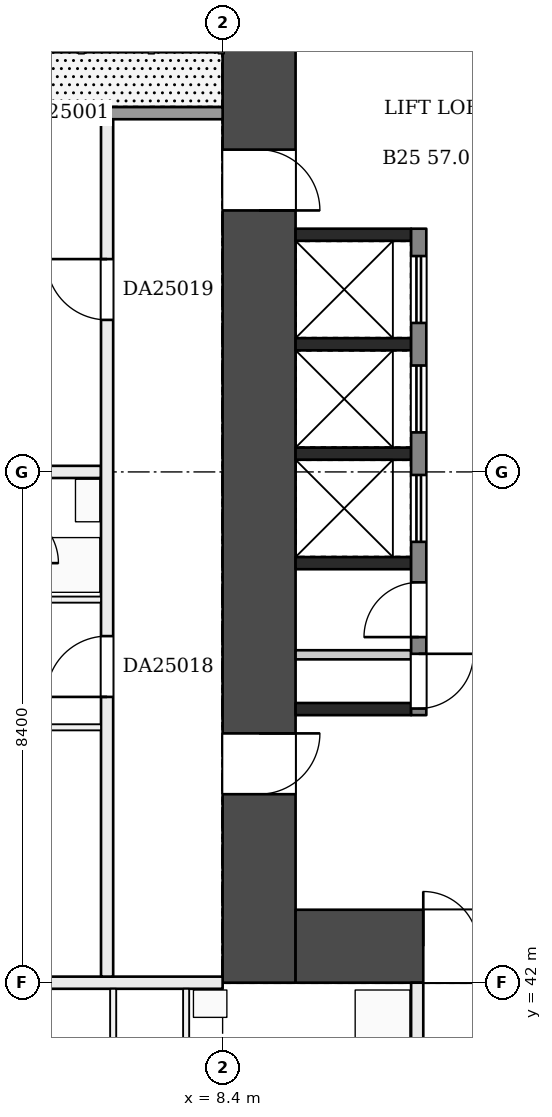
"""IFC4 building model, lengths in metres.
Left out: names, types, materials, properties, quantities, classifications, styles, units other than length and angle.
Written with IfcOpenShell. Run it as: python <this file> out.ifc"""

import sys

from ifc_helpers import new_model, si_unit, direction, frame, frame_2d, origin, place, context, subcontext, project, spatial, rectangle, extrude, element, fill, save


model = new_model("IFC4")
c1 = context("Model", 3, precision=1e-05, world=origin(), true_north=direction((0.0, 1.0)))
c2 = subcontext(c1, "Body", "Model", "MODEL_VIEW")
j1 = project(units=[si_unit("LENGTHUNIT", "METRE"), si_unit("PLANEANGLEUNIT", "RADIAN")], contexts=[c1])
p1 = place(None, origin())
s1 = spatial("IfcSite", under=j1, at=p1, CompositionType="ELEMENT")
p2 = place(p1, origin())
s2 = spatial("IfcBuilding", under=s1, at=p2, CompositionType="ELEMENT")
p3 = place(p2, frame((0.0, 0.0, 102.2)))
s3 = spatial("IfcBuildingStorey", under=s2, at=p3, CompositionType="ELEMENT", Elevation=102.2)
p4 = place(p3, frame((9.0, 58.8, 0.0), z_axis=(0.0, 0.0, 1.0), x_axis=(0.0, -1.0, 0.0)))
e1 = element("IfcWall", 1, at=p4, inside=s3, PredefinedType="SHEAR", context=c2, shape_type="SweptSolid", body=[
    extrude(rectangle(XDim=16.8, YDim=1.2, at=frame_2d((8.4, 0.0))), origin(), (0.0, 0.0, 1.0), 3.22),
])
p5 = place(p4, frame((3.1, 0.0, 0.0)))
e2 = element("IfcOpeningElement", 2, at=p5, cuts=e1, PredefinedType="OPENING", context=c2, shape_type="SweptSolid", body=[
    extrude(rectangle(XDim=1.0, YDim=2.1, at=frame_2d((0.5, 1.05))), frame((0.0, 0.61, 0.0), z_axis=(0.0, -1.0, 0.0), x_axis=(1.0, 0.0, 0.0)), (0.0, 0.0, 1.0), 1.22),
])
p6 = place(p4, frame((12.7, 0.0, 0.0)))
e3 = element("IfcOpeningElement", 3, at=p6, cuts=e1, PredefinedType="OPENING", context=c2, shape_type="SweptSolid", body=[
    extrude(rectangle(XDim=1.0, YDim=2.1, at=frame_2d((0.5, 1.05))), frame((0.0, 0.61, 0.0), z_axis=(0.0, -1.0, 0.0), x_axis=(1.0, 0.0, 0.0)), (0.0, 0.0, 1.0), 1.22),
])
p7 = place(p3, frame((9.6, 42.6, 0.0), z_axis=(0.0, 0.0, 1.0), x_axis=(1.0, 0.0, 0.0)))
e4 = element("IfcWall", 4, at=p7, inside=s3, PredefinedType="SHEAR", context=c2, shape_type="SweptSolid", body=[
    extrude(rectangle(XDim=14.4, YDim=1.2, at=frame_2d((7.2, 0.0))), origin(), (0.0, 0.0, 1.0), 3.22),
])
p8 = place(p7, frame((2.1, 0.0, 0.0)))
e5 = element("IfcOpeningElement", 5, at=p8, cuts=e4, PredefinedType="OPENING", context=c2, shape_type="SweptSolid", body=[
    extrude(rectangle(XDim=1.8, YDim=2.1, at=frame_2d((0.9, 1.05))), frame((0.0, 0.61, 0.0), z_axis=(0.0, -1.0, 0.0), x_axis=(1.0, 0.0, 0.0)), (0.0, 0.0, 1.0), 1.22),
])
for number, where, z_axis, x_axis in (
    (6, (9.6, 54.3, 0.0), (0.0, 0.0, 1.0), (1.0, 0.0, 0.0)),
    (7, (9.6, 52.5, 0.0), (0.0, 0.0, 1.0), (1.0, 0.0, 0.0)),
    (8, (9.6, 50.7, 0.0), (0.0, 0.0, 1.0), (1.0, 0.0, 0.0)),
    (9, (9.6, 48.9, 0.0), (0.0, 0.0, 1.0), (1.0, 0.0, 0.0)),
    (10, (9.6, 46.5, 0.0), (0.0, 0.0, 1.0), (1.0, 0.0, 0.0)),
):
    element("IfcWall", number, at=place(p3, frame(where, z_axis=z_axis, x_axis=x_axis)), inside=s3, PredefinedType="SHEAR", context=c2, shape_type="SweptSolid", body=[
        extrude(rectangle(XDim=1.9, YDim=0.2, at=frame_2d((0.95, 0.0))), origin(), (0.0, 0.0, 1.0), 3.22),
    ])
p9 = place(p3, frame((9.6, 47.393, 0.0), z_axis=(0.0, 0.0, 1.0), x_axis=(1.0, 0.0, 0.0)))
e11 = element("IfcWall", 11, at=p9, inside=s3, PredefinedType="PARTITIONING", context=c2, shape_type="SweptSolid", body=[
    extrude(rectangle(XDim=1.9, YDim=0.15, at=frame_2d((0.95, 0.0))), origin(), (0.0, 0.0, 1.0), 3.22),
])
p10 = place(p3, frame((11.625, 54.4, 0.0), z_axis=(0.0, 0.0, 1.0), x_axis=(0.0, -1.0, 0.0)))
e12 = element("IfcWall", 12, at=p10, inside=s3, PredefinedType="SHEAR", context=c2, shape_type="SweptSolid", body=[
    extrude(rectangle(XDim=8.0, YDim=0.25, at=frame_2d((4.0, 0.0))), origin(), (0.0, 0.0, 1.0), 3.22),
])
p11 = place(p10, frame((0.45, 0.0, 0.0)))
e13 = element("IfcOpeningElement", 13, at=p11, cuts=e12, PredefinedType="OPENING", context=c2, shape_type="SweptSolid", body=[
    extrude(rectangle(XDim=1.1, YDim=2.1, at=frame_2d((0.55, 1.05))), frame((0.0, 0.135, 0.0), z_axis=(0.0, -1.0, 0.0), x_axis=(1.0, 0.0, 0.0)), (0.0, 0.0, 1.0), 0.27),
])
p12 = place(p10, frame((2.25, 0.0, 0.0)))
e14 = element("IfcOpeningElement", 14, at=p12, cuts=e12, PredefinedType="OPENING", context=c2, shape_type="SweptSolid", body=[
    extrude(rectangle(XDim=1.1, YDim=2.1, at=frame_2d((0.55, 1.05))), frame((0.0, 0.135, 0.0), z_axis=(0.0, -1.0, 0.0), x_axis=(1.0, 0.0, 0.0)), (0.0, 0.0, 1.0), 0.27),
])
p13 = place(p10, frame((4.05, 0.0, 0.0)))
e15 = element("IfcOpeningElement", 15, at=p13, cuts=e12, PredefinedType="OPENING", context=c2, shape_type="SweptSolid", body=[
    extrude(rectangle(XDim=1.1, YDim=2.1, at=frame_2d((0.55, 1.05))), frame((0.0, 0.135, 0.0), z_axis=(0.0, -1.0, 0.0), x_axis=(1.0, 0.0, 0.0)), (0.0, 0.0, 1.0), 0.27),
])
p14 = place(p10, frame((5.816, 0.0, 0.0)))
e16 = element("IfcOpeningElement", 16, at=p14, cuts=e12, PredefinedType="OPENING", context=c2, shape_type="SweptSolid", body=[
    extrude(rectangle(XDim=0.9, YDim=2.1, at=frame_2d((0.45, 1.05))), frame((0.0, 0.135, 0.0), z_axis=(0.0, -1.0, 0.0), x_axis=(1.0, 0.0, 0.0)), (0.0, 0.0, 1.0), 0.27),
])
p15 = place(p10, frame((6.991, 0.0, 0.0)))
e17 = element("IfcOpeningElement", 17, at=p15, cuts=e12, PredefinedType="OPENING", context=c2, shape_type="SweptSolid", body=[
    extrude(rectangle(XDim=0.9, YDim=2.1, at=frame_2d((0.45, 1.05))), frame((0.0, 0.135, 0.0), z_axis=(0.0, -1.0, 0.0), x_axis=(1.0, 0.0, 0.0)), (0.0, 0.0, 1.0), 0.27),
])
p16 = place(p3, frame((2.5, 42.0, 0.0), z_axis=(0.0, 0.0, 1.0), x_axis=(1.0, 0.0, 0.0)))
e18 = element("IfcWall", 18, at=p16, inside=s3, PredefinedType="PARTITIONING", context=c2, shape_type="SweptSolid", body=[
    extrude(rectangle(XDim=5.9, YDim=0.2, at=frame_2d((2.95, 0.0))), origin(), (0.0, 0.0, 1.0), 3.22),
])
p17 = place(p3, frame((2.5, 46.2, 0.0), z_axis=(0.0, 0.0, 1.0), x_axis=(1.0, 0.0, 0.0)))
e19 = element("IfcWall", 19, at=p17, inside=s3, PredefinedType="PARTITIONING", context=c2, shape_type="SweptSolid", body=[
    extrude(rectangle(XDim=3.9, YDim=0.1, at=frame_2d((1.95, 0.0))), origin(), (0.0, 0.0, 1.0), 3.22),
])
p18 = place(p17, frame((0.6, 0.0, 0.0)))
e20 = element("IfcOpeningElement", 20, at=p18, cuts=e19, PredefinedType="OPENING", context=c2, shape_type="SweptSolid", body=[
    extrude(rectangle(XDim=0.9, YDim=2.1, at=frame_2d((0.45, 1.05))), frame((0.0, 0.06, 0.0), z_axis=(0.0, -1.0, 0.0), x_axis=(1.0, 0.0, 0.0)), (0.0, 0.0, 1.0), 0.12),
])
p19 = place(p3, frame((4.85, 48.3, 0.0), z_axis=(0.0, 0.0, 1.0), x_axis=(1.0, 0.0, 0.0)))
e21 = element("IfcWall", 21, at=p19, inside=s3, PredefinedType="PARTITIONING", context=c2, shape_type="SweptSolid", body=[
    extrude(rectangle(XDim=1.55, YDim=0.1, at=frame_2d((0.775, 0.0))), origin(), (0.0, 0.0, 1.0), 3.22),
])
p20 = place(p3, frame((2.5, 50.4, 0.0), z_axis=(0.0, 0.0, 1.0), x_axis=(1.0, 0.0, 0.0)))
e22 = element("IfcWall", 22, at=p20, inside=s3, PredefinedType="PARTITIONING", context=c2, shape_type="SweptSolid", body=[
    extrude(rectangle(XDim=3.9, YDim=0.2, at=frame_2d((1.95, 0.0))), origin(), (0.0, 0.0, 1.0), 3.22),
])
p21 = place(p3, frame((6.5, 42.1, 0.0), z_axis=(0.0, 0.0, 1.0), x_axis=(0.0, 1.0, 0.0)))
e23 = element("IfcWall", 23, at=p21, inside=s3, PredefinedType="PARTITIONING", context=c2, shape_type="SweptSolid", body=[
    extrude(rectangle(XDim=14.2, YDim=0.2, at=frame_2d((7.1, 0.0))), origin(), (0.0, 0.0, 1.0), 3.22),
])
p22 = place(p21, frame((4.6, 0.0, 0.0)))
e24 = element("IfcOpeningElement", 24, at=p22, cuts=e23, PredefinedType="OPENING", context=c2, shape_type="SweptSolid", body=[
    extrude(rectangle(XDim=1.0, YDim=2.1, at=frame_2d((0.5, 1.05))), frame((0.0, 0.11, 0.0), z_axis=(0.0, -1.0, 0.0), x_axis=(1.0, 0.0, 0.0)), (0.0, 0.0, 1.0), 0.22),
])
p23 = place(p21, frame((10.8, 0.0, 0.0)))
e25 = element("IfcOpeningElement", 25, at=p23, cuts=e23, PredefinedType="OPENING", context=c2, shape_type="SweptSolid", body=[
    extrude(rectangle(XDim=1.0, YDim=2.1, at=frame_2d((0.5, 1.05))), frame((0.0, 0.11, 0.0), z_axis=(0.0, -1.0, 0.0), x_axis=(1.0, 0.0, 0.0)), (0.0, 0.0, 1.0), 0.22),
])
p24 = place(p3, frame((6.6, 16.85, 0.0), z_axis=(0.0, 0.0, 1.0), x_axis=(0.0, 1.0, 0.0)))
e26 = element("IfcWall", 26, at=p24, inside=s3, PredefinedType="PARTITIONING", context=c2, shape_type="SweptSolid", body=[
    extrude(rectangle(XDim=25.05, YDim=0.1, at=frame_2d((12.525, 0.0))), origin(), (0.0, 0.0, 1.0), 3.22),
])
p25 = place(p24, frame((1.55, 0.0, 0.0)))
e27 = element("IfcOpeningElement", 27, at=p25, cuts=e26, PredefinedType="OPENING", context=c2, shape_type="SweptSolid", body=[
    extrude(rectangle(XDim=0.9, YDim=2.1, at=frame_2d((0.45, 1.05))), frame((0.0, 0.06, 0.0), z_axis=(0.0, -1.0, 0.0), x_axis=(1.0, 0.0, 0.0)), (0.0, 0.0, 1.0), 0.12),
])
p26 = place(p24, frame((9.95, 0.0, 0.0)))
e28 = element("IfcOpeningElement", 28, at=p26, cuts=e26, PredefinedType="OPENING", context=c2, shape_type="SweptSolid", body=[
    extrude(rectangle(XDim=0.9, YDim=2.1, at=frame_2d((0.45, 1.05))), frame((0.0, 0.06, 0.0), z_axis=(0.0, -1.0, 0.0), x_axis=(1.0, 0.0, 0.0)), (0.0, 0.0, 1.0), 0.12),
])
p27 = place(p24, frame((18.35, 0.0, 0.0)))
e29 = element("IfcOpeningElement", 29, at=p27, cuts=e26, PredefinedType="OPENING", context=c2, shape_type="SweptSolid", body=[
    extrude(rectangle(XDim=0.9, YDim=2.1, at=frame_2d((0.45, 1.05))), frame((0.0, 0.06, 0.0), z_axis=(0.0, -1.0, 0.0), x_axis=(1.0, 0.0, 0.0)), (0.0, 0.0, 1.0), 0.12),
])
p28 = place(p24, frame((22.55, 0.0, 0.0)))
e30 = element("IfcOpeningElement", 30, at=p28, cuts=e26, PredefinedType="OPENING", context=c2, shape_type="SweptSolid", body=[
    extrude(rectangle(XDim=0.9, YDim=2.1, at=frame_2d((0.45, 1.05))), frame((0.0, 0.06, 0.0), z_axis=(0.0, -1.0, 0.0), x_axis=(1.0, 0.0, 0.0)), (0.0, 0.0, 1.0), 0.12),
])
p29 = place(p3, frame((7.8, 21.0, 0.0), z_axis=(0.0, 0.0, 1.0), x_axis=(0.0, 1.0, 0.0)))
e31 = element("IfcWall", 31, at=p29, inside=s3, PredefinedType="PARTITIONING", context=c2, shape_type="SweptSolid", body=[
    extrude(rectangle(XDim=20.9, YDim=0.1, at=frame_2d((10.45, 0.0))), origin(), (0.0, 0.0, 1.0), 3.22),
])
p30 = place(p29, frame((1.5, 0.0, 0.0)))
e32 = element("IfcOpeningElement", 32, at=p30, cuts=e31, PredefinedType="OPENING", context=c2, shape_type="SweptSolid", body=[
    extrude(rectangle(XDim=0.9, YDim=2.1, at=frame_2d((0.45, 1.05))), frame((0.0, 0.06, 0.0), z_axis=(0.0, -1.0, 0.0), x_axis=(1.0, 0.0, 0.0)), (0.0, 0.0, 1.0), 0.12),
])
p31 = place(p29, frame((5.48, 0.0, 0.0)))
e33 = element("IfcOpeningElement", 33, at=p31, cuts=e31, PredefinedType="OPENING", context=c2, shape_type="SweptSolid", body=[
    extrude(rectangle(XDim=0.9, YDim=2.1, at=frame_2d((0.45, 1.05))), frame((0.0, 0.06, 0.0), z_axis=(0.0, -1.0, 0.0), x_axis=(1.0, 0.0, 0.0)), (0.0, 0.0, 1.0), 0.12),
])
p32 = place(p29, frame((9.26, 0.0, 0.0)))
e34 = element("IfcOpeningElement", 34, at=p32, cuts=e31, PredefinedType="OPENING", context=c2, shape_type="SweptSolid", body=[
    extrude(rectangle(XDim=0.9, YDim=2.1, at=frame_2d((0.45, 1.05))), frame((0.0, 0.06, 0.0), z_axis=(0.0, -1.0, 0.0), x_axis=(1.0, 0.0, 0.0)), (0.0, 0.0, 1.0), 0.12),
])
p33 = place(p29, frame((13.64, 0.0, 0.0)))
e35 = element("IfcOpeningElement", 35, at=p33, cuts=e31, PredefinedType="OPENING", context=c2, shape_type="SweptSolid", body=[
    extrude(rectangle(XDim=0.9, YDim=2.1, at=frame_2d((0.45, 1.05))), frame((0.0, 0.06, 0.0), z_axis=(0.0, -1.0, 0.0), x_axis=(1.0, 0.0, 0.0)), (0.0, 0.0, 1.0), 0.12),
])
p34 = place(p29, frame((18.32, 0.0, 0.0)))
e36 = element("IfcOpeningElement", 36, at=p34, cuts=e31, PredefinedType="OPENING", context=c2, shape_type="SweptSolid", body=[
    extrude(rectangle(XDim=0.9, YDim=2.1, at=frame_2d((0.45, 1.05))), frame((0.0, 0.06, 0.0), z_axis=(0.0, -1.0, 0.0), x_axis=(1.0, 0.0, 0.0)), (0.0, 0.0, 1.0), 0.12),
])
p35 = place(p3, frame((11.6, 10.9, 0.0), z_axis=(0.0, 0.0, 1.0), x_axis=(0.0, 1.0, 0.0)))
e37 = element("IfcWall", 37, at=p35, inside=s3, PredefinedType="PARTITIONING", context=c2, shape_type="SweptSolid", body=[
    extrude(rectangle(XDim=31.1, YDim=0.2, at=frame_2d((15.55, 0.0))), origin(), (0.0, 0.0, 1.0), 3.22),
])
p36 = place(p35, frame((8.5, 0.0, 0.0)))
e38 = element("IfcOpeningElement", 38, at=p36, cuts=e37, PredefinedType="OPENING", context=c2, shape_type="SweptSolid", body=[
    extrude(rectangle(XDim=1.0, YDim=2.1, at=frame_2d((0.5, 1.05))), frame((0.0, 0.11, 0.0), z_axis=(0.0, -1.0, 0.0), x_axis=(1.0, 0.0, 0.0)), (0.0, 0.0, 1.0), 0.22),
])
p37 = place(p35, frame((11.6, 0.0, 0.0)))
e39 = element("IfcOpeningElement", 39, at=p37, cuts=e37, PredefinedType="OPENING", context=c2, shape_type="SweptSolid", body=[
    extrude(rectangle(XDim=1.0, YDim=2.1, at=frame_2d((0.5, 1.05))), frame((0.0, 0.11, 0.0), z_axis=(0.0, -1.0, 0.0), x_axis=(1.0, 0.0, 0.0)), (0.0, 0.0, 1.0), 0.22),
])
p38 = place(p3, frame((8.4, 56.3, 0.0), z_axis=(0.0, 0.0, 1.0), x_axis=(-1.0, 0.0, 0.0)))
e40 = element("IfcWall", 40, at=p38, inside=s3, PredefinedType="SOLIDWALL", context=c2, shape_type="SweptSolid", body=[
    extrude(rectangle(XDim=3.6, YDim=0.2, at=frame_2d((1.8, 0.0))), origin(), (0.0, 0.0, 1.0), 3.22),
])
p39 = place(p38, frame((2.0, 0.0, 0.9)))
e41 = element("IfcOpeningElement", 41, at=p39, cuts=e40, PredefinedType="OPENING", context=c2, shape_type="SweptSolid", body=[
    extrude(rectangle(XDim=1.3, YDim=1.5, at=frame_2d((0.65, 0.75))), frame((0.0, 0.11, 0.0), z_axis=(0.0, -1.0, 0.0), x_axis=(1.0, 0.0, 0.0)), (0.0, 0.0, 1.0), 0.22),
])
p40 = place(p5, origin())
e42 = element("IfcDoor", 42, at=p40, inside=s3, OperationType="SINGLE_SWING_RIGHT", PredefinedType="DOOR", context=c2, shape_type="SweptSolid", body=[
    extrude(rectangle(XDim=1.0, YDim=2.1, at=frame_2d((0.5, 1.05))), frame((0.0, 0.025, 0.0), z_axis=(0.0, -1.0, 0.0), x_axis=(1.0, 0.0, 0.0)), (0.0, 0.0, 1.0), 0.05),
])
fill(e2, e42)
p41 = place(p6, origin())
e43 = element("IfcDoor", 43, at=p41, inside=s3, OperationType="SINGLE_SWING_LEFT", PredefinedType="DOOR", context=c2, shape_type="SweptSolid", body=[
    extrude(rectangle(XDim=1.0, YDim=2.1, at=frame_2d((0.5, 1.05))), frame((0.0, 0.025, 0.0), z_axis=(0.0, -1.0, 0.0), x_axis=(1.0, 0.0, 0.0)), (0.0, 0.0, 1.0), 0.05),
])
fill(e3, e43)
p42 = place(p8, origin())
e44 = element("IfcDoor", 44, at=p42, inside=s3, OperationType="DOUBLE_DOOR_SINGLE_SWING", PredefinedType="DOOR", context=c2, shape_type="SweptSolid", body=[
    extrude(rectangle(XDim=1.8, YDim=2.1, at=frame_2d((0.9, 1.05))), frame((0.0, 0.025, 0.0), z_axis=(0.0, -1.0, 0.0), x_axis=(1.0, 0.0, 0.0)), (0.0, 0.0, 1.0), 0.05),
])
fill(e5, e44)
p43 = place(p11, origin())
e45 = element("IfcDoor", 45, at=p43, inside=s3, OperationType="DOUBLE_DOOR_SLIDING", PredefinedType="DOOR", context=c2, shape_type="SweptSolid", body=[
    extrude(rectangle(XDim=1.1, YDim=2.1, at=frame_2d((0.55, 1.05))), frame((0.0, 0.025, 0.0), z_axis=(0.0, -1.0, 0.0), x_axis=(1.0, 0.0, 0.0)), (0.0, 0.0, 1.0), 0.05),
])
fill(e13, e45)
p44 = place(p12, origin())
e46 = element("IfcDoor", 46, at=p44, inside=s3, OperationType="DOUBLE_DOOR_SLIDING", PredefinedType="DOOR", context=c2, shape_type="SweptSolid", body=[
    extrude(rectangle(XDim=1.1, YDim=2.1, at=frame_2d((0.55, 1.05))), frame((0.0, 0.025, 0.0), z_axis=(0.0, -1.0, 0.0), x_axis=(1.0, 0.0, 0.0)), (0.0, 0.0, 1.0), 0.05),
])
fill(e14, e46)
p45 = place(p13, origin())
e47 = element("IfcDoor", 47, at=p45, inside=s3, OperationType="DOUBLE_DOOR_SLIDING", PredefinedType="DOOR", context=c2, shape_type="SweptSolid", body=[
    extrude(rectangle(XDim=1.1, YDim=2.1, at=frame_2d((0.55, 1.05))), frame((0.0, 0.025, 0.0), z_axis=(0.0, -1.0, 0.0), x_axis=(1.0, 0.0, 0.0)), (0.0, 0.0, 1.0), 0.05),
])
fill(e15, e47)
p46 = place(p14, frame((0.9, 0.0, 0.0), z_axis=(0.0, 0.0, 1.0), x_axis=(-1.0, 0.0, 0.0)))
e48 = element("IfcDoor", 48, at=p46, inside=s3, OperationType="SINGLE_SWING_LEFT", PredefinedType="DOOR", context=c2, shape_type="SweptSolid", body=[
    extrude(rectangle(XDim=0.9, YDim=2.1, at=frame_2d((0.45, 1.05))), frame((0.0, 0.025, 0.0), z_axis=(0.0, -1.0, 0.0), x_axis=(1.0, 0.0, 0.0)), (0.0, 0.0, 1.0), 0.05),
])
fill(e16, e48)
p47 = place(p15, origin())
e49 = element("IfcDoor", 49, at=p47, inside=s3, OperationType="SINGLE_SWING_LEFT", PredefinedType="DOOR", context=c2, shape_type="SweptSolid", body=[
    extrude(rectangle(XDim=0.9, YDim=2.1, at=frame_2d((0.45, 1.05))), frame((0.0, 0.025, 0.0), z_axis=(0.0, -1.0, 0.0), x_axis=(1.0, 0.0, 0.0)), (0.0, 0.0, 1.0), 0.05),
])
fill(e17, e49)
p48 = place(p22, origin())
e50 = element("IfcDoor", 50, at=p48, inside=s3, OperationType="SINGLE_SWING_LEFT", PredefinedType="DOOR", context=c2, shape_type="SweptSolid", body=[
    extrude(rectangle(XDim=1.0, YDim=2.1, at=frame_2d((0.5, 1.05))), frame((0.0, 0.025, 0.0), z_axis=(0.0, -1.0, 0.0), x_axis=(1.0, 0.0, 0.0)), (0.0, 0.0, 1.0), 0.05),
])
fill(e24, e50)
p49 = place(p23, origin())
e51 = element("IfcDoor", 51, at=p49, inside=s3, OperationType="SINGLE_SWING_RIGHT", PredefinedType="DOOR", context=c2, shape_type="SweptSolid", body=[
    extrude(rectangle(XDim=1.0, YDim=2.1, at=frame_2d((0.5, 1.05))), frame((0.0, 0.025, 0.0), z_axis=(0.0, -1.0, 0.0), x_axis=(1.0, 0.0, 0.0)), (0.0, 0.0, 1.0), 0.05),
])
fill(e25, e51)
p50 = place(p39, origin())
e52 = element("IfcWindow", 52, at=p50, inside=s3, PartitioningType="SINGLE_PANEL", PredefinedType="WINDOW", context=c2, shape_type="SweptSolid", body=[
    extrude(rectangle(XDim=1.3, YDim=1.5, at=frame_2d((0.65, 0.75))), frame((0.0, 0.03, 0.0), z_axis=(0.0, -1.0, 0.0), x_axis=(1.0, 0.0, 0.0)), (0.0, 0.0, 1.0), 0.06),
])
fill(e41, e52)
save(model, sys.argv[1])
